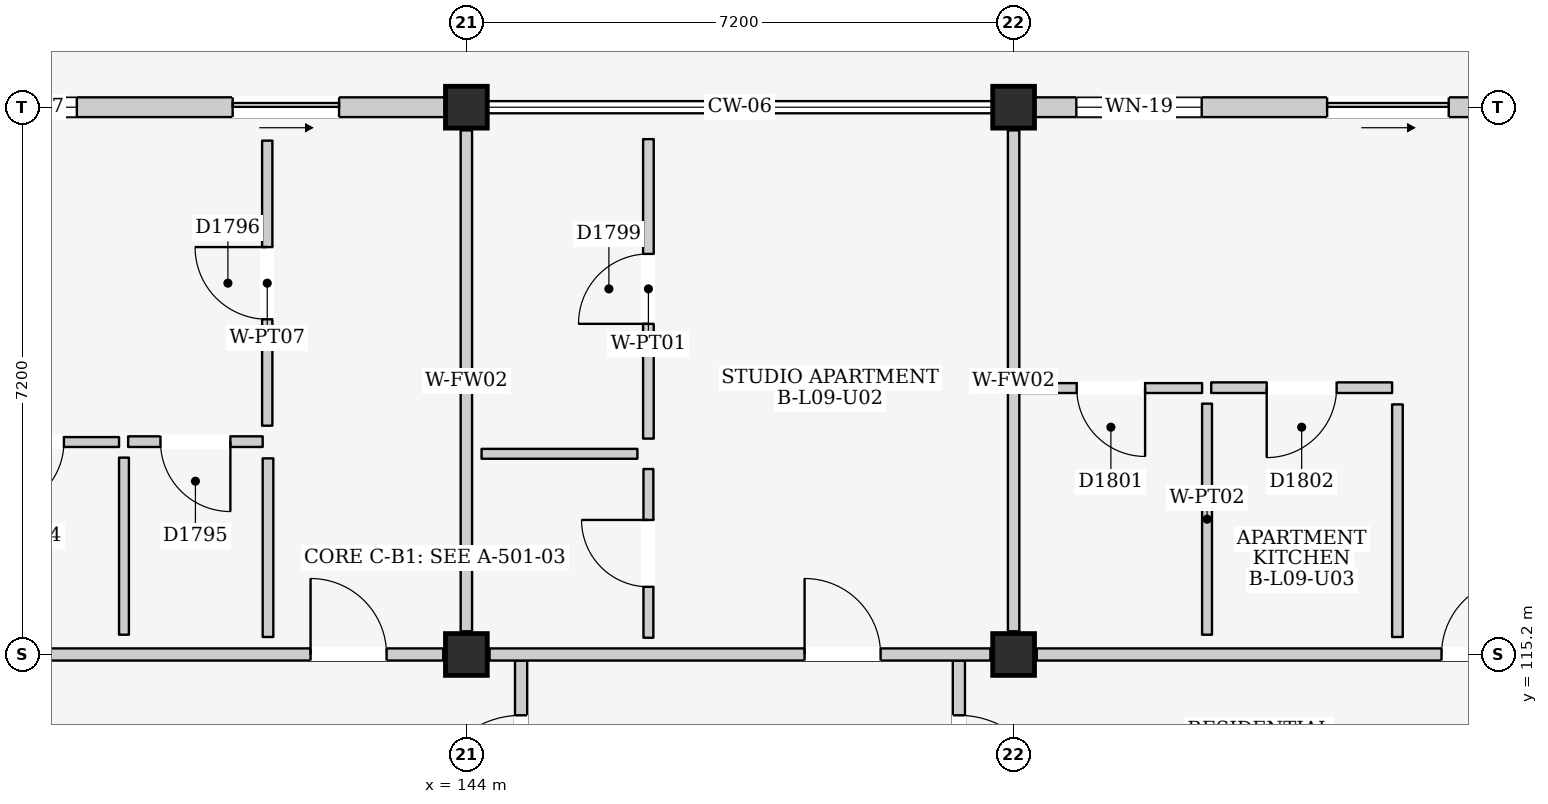
"""IFC4 building model, lengths in metres.
Left out: names, types, materials, properties, quantities, classifications, styles, units other than length and angle.
Written with IfcOpenShell. Run it as: python <this file> out.ifc"""

import sys

from ifc_helpers import new_model, si_unit, direction, frame, frame_2d, origin, origin_2d, place, context, subcontext, project, spatial, rectangle, extrude, element, fill, save


model = new_model("IFC4")
c1 = context("Model", 3, precision=1e-05, world=origin(), true_north=direction((0.0, 1.0)))
c2 = subcontext(c1, "Body", "Model", "MODEL_VIEW")
j1 = project(units=[si_unit("LENGTHUNIT", "METRE"), si_unit("PLANEANGLEUNIT", "RADIAN")], contexts=[c1])
p1 = place(None, origin())
s1 = spatial("IfcSite", under=j1, at=p1, CompositionType="ELEMENT")
p2 = place(p1, origin())
s2 = spatial("IfcBuilding", under=s1, at=p2, CompositionType="ELEMENT")
p3 = place(p2, frame((0.0, 0.0, 31.5)))
s3 = spatial("IfcBuildingStorey", under=s2, at=p3, CompositionType="ELEMENT", Elevation=31.5)
for number, where, z_axis, x_axis in (
    (1, (144.0, 115.2, 0.0), (0.0, 0.0, 1.0), (1.0, 0.0, 0.0)),
    (2, (144.0, 122.4, 0.0), (0.0, 0.0, 1.0), (1.0, 0.0, 0.0)),
    (3, (151.2, 115.2, 0.0), (0.0, 0.0, 1.0), (1.0, 0.0, 0.0)),
    (4, (151.2, 122.4, 0.0), (0.0, 0.0, 1.0), (1.0, 0.0, 0.0)),
):
    element("IfcColumn", number, at=place(p3, frame(where, z_axis=z_axis, x_axis=x_axis)), inside=s3, PredefinedType="COLUMN", context=c2, shape_type="SweptSolid", body=[
        extrude(rectangle(XDim=0.55, YDim=0.55, at=origin_2d()), origin(), (0.0, 0.0, 1.0), 3.3),
    ])
p4 = place(p3, frame((137.075, 122.4, 0.0), z_axis=(0.0, 0.0, 1.0), x_axis=(1.0, 0.0, 0.0)))
e5 = element("IfcWall", 5, at=p4, inside=s3, PredefinedType="ELEMENTEDWALL", context=c2, shape_type="SweptSolid", body=[
    extrude(rectangle(XDim=6.65, YDim=0.26, at=frame_2d((3.325, 0.0))), origin(), (0.0, 0.0, 1.0), 2.615),
])
p5 = place(p4, frame((3.85, 0.0, 0.0)))
e6 = element("IfcOpeningElement", 6, at=p5, cuts=e5, PredefinedType="OPENING", context=c2, shape_type="SweptSolid", body=[
    extrude(rectangle(XDim=1.4, YDim=2.1, at=frame_2d((0.7, 1.05))), frame((0.0, 0.145, 0.0), z_axis=(0.0, -1.0, 0.0), x_axis=(1.0, 0.0, 0.0)), (0.0, 0.0, 1.0), 0.29),
])
p6 = place(p4, frame((0.55, 0.0, 0.9)))
e7 = element("IfcOpeningElement", 7, at=p6, cuts=e5, PredefinedType="OPENING", context=c2, shape_type="SweptSolid", body=[
    extrude(rectangle(XDim=1.25, YDim=1.3, at=frame_2d((0.625, 0.65))), frame((0.0, 0.145, 0.0), z_axis=(0.0, -1.0, 0.0), x_axis=(1.0, 0.0, 0.0)), (0.0, 0.0, 1.0), 0.29),
])
p7 = place(p3, frame((151.475, 122.4, 0.0), z_axis=(0.0, 0.0, 1.0), x_axis=(1.0, 0.0, 0.0)))
e8 = element("IfcWall", 8, at=p7, inside=s3, PredefinedType="ELEMENTEDWALL", context=c2, shape_type="SweptSolid", body=[
    extrude(rectangle(XDim=6.65, YDim=0.26, at=frame_2d((3.325, 0.0))), origin(), (0.0, 0.0, 1.0), 2.615),
])
p8 = place(p7, frame((3.85, 0.0, 0.0)))
e9 = element("IfcOpeningElement", 9, at=p8, cuts=e8, PredefinedType="OPENING", context=c2, shape_type="SweptSolid", body=[
    extrude(rectangle(XDim=1.6, YDim=2.12, at=frame_2d((0.8, 1.06))), frame((0.0, 0.145, 0.0), z_axis=(0.0, -1.0, 0.0), x_axis=(1.0, 0.0, 0.0)), (0.0, 0.0, 1.0), 0.29),
])
p9 = place(p7, frame((0.55, 0.0, 0.9)))
e10 = element("IfcOpeningElement", 10, at=p9, cuts=e8, PredefinedType="OPENING", context=c2, shape_type="SweptSolid", body=[
    extrude(rectangle(XDim=1.65, YDim=1.35, at=frame_2d((0.825, 0.675))), frame((0.0, 0.145, 0.0), z_axis=(0.0, -1.0, 0.0), x_axis=(1.0, 0.0, 0.0)), (0.0, 0.0, 1.0), 0.29),
])
p10 = place(p3, frame((144.72, 111.1, 0.0), z_axis=(0.0, 0.0, 1.0), x_axis=(0.0, 1.0, 0.0)))
e11 = element("IfcWall", 11, at=p10, inside=s3, PredefinedType="PARTITIONING", context=c2, shape_type="SweptSolid", body=[
    extrude(rectangle(XDim=4.02, YDim=0.16, at=frame_2d((2.01, 0.0))), origin(), (0.0, 0.0, 1.0), 3.08),
])
p11 = place(p10, frame((2.1, 0.0, 0.0)))
e12 = element("IfcOpeningElement", 12, at=p11, cuts=e11, PredefinedType="OPENING", context=c2, shape_type="SweptSolid", body=[
    extrude(rectangle(XDim=1.2, YDim=2.2, at=frame_2d((0.6, 1.1))), frame((0.0, 0.095, 0.0), z_axis=(0.0, -1.0, 0.0), x_axis=(1.0, 0.0, 0.0)), (0.0, 0.0, 1.0), 0.19),
])
p12 = place(p3, frame((150.48, 111.1, 0.0), z_axis=(0.0, 0.0, 1.0), x_axis=(0.0, 1.0, 0.0)))
e13 = element("IfcWall", 13, at=p12, inside=s3, PredefinedType="PARTITIONING", context=c2, shape_type="SweptSolid", body=[
    extrude(rectangle(XDim=4.02, YDim=0.16, at=frame_2d((2.01, 0.0))), origin(), (0.0, 0.0, 1.0), 3.08),
])
p13 = place(p12, frame((2.1, 0.0, 0.0)))
e14 = element("IfcOpeningElement", 14, at=p13, cuts=e13, PredefinedType="OPENING", context=c2, shape_type="SweptSolid", body=[
    extrude(rectangle(XDim=1.2, YDim=2.2, at=frame_2d((0.6, 1.1))), frame((0.0, 0.095, 0.0), z_axis=(0.0, -1.0, 0.0), x_axis=(1.0, 0.0, 0.0)), (0.0, 0.0, 1.0), 0.19),
])
p14 = place(p3, frame((137.105, 115.2, 0.0), z_axis=(0.0, 0.0, 1.0), x_axis=(1.0, 0.0, 0.0)))
e15 = element("IfcWall", 15, at=p14, inside=s3, PredefinedType="PARTITIONING", context=c2, shape_type="SweptSolid", body=[
    extrude(rectangle(XDim=6.59, YDim=0.16, at=frame_2d((3.295, 0.0))), origin(), (0.0, 0.0, 1.0), 2.465),
])
p15 = place(p14, frame((4.845, 0.0, 0.0)))
e16 = element("IfcOpeningElement", 16, at=p15, cuts=e15, PredefinedType="OPENING", context=c2, shape_type="SweptSolid", body=[
    extrude(rectangle(XDim=1.0, YDim=2.15, at=frame_2d((0.5, 1.075))), frame((0.0, 0.095, 0.0), z_axis=(0.0, -1.0, 0.0), x_axis=(1.0, 0.0, 0.0)), (0.0, 0.0, 1.0), 0.19),
])
p16 = place(p3, frame((144.0, 115.505, 0.0), z_axis=(0.0, 0.0, 1.0), x_axis=(0.0, 1.0, 0.0)))
e17 = element("IfcWall", 17, at=p16, inside=s3, PredefinedType="PARTITIONING", context=c2, shape_type="SweptSolid", body=[
    extrude(rectangle(XDim=6.59, YDim=0.15, at=frame_2d((3.295, 0.0))), origin(), (0.0, 0.0, 1.0), 2.565),
])
p17 = place(p3, frame((137.08, 117.995, 0.0), z_axis=(0.0, 0.0, 1.0), x_axis=(1.0, 0.0, 0.0)))
e18 = element("IfcWall", 18, at=p17, inside=s3, PredefinedType="PARTITIONING", context=c2, shape_type="SweptSolid", body=[
    extrude(rectangle(XDim=2.35, YDim=0.13, at=frame_2d((1.175, 0.0))), origin(), (0.0, 0.0, 1.0), 3.08),
])
p18 = place(p17, frame((0.725, 0.0, 0.0)))
e19 = element("IfcOpeningElement", 19, at=p18, cuts=e18, PredefinedType="OPENING", context=c2, shape_type="SweptSolid", body=[
    extrude(rectangle(XDim=0.9, YDim=2.1, at=frame_2d((0.45, 1.05))), frame((0.0, 0.08, 0.0), z_axis=(0.0, -1.0, 0.0), x_axis=(1.0, 0.0, 0.0)), (0.0, 0.0, 1.0), 0.16),
])
p19 = place(p3, frame((139.495, 115.46, 0.0), z_axis=(0.0, 0.0, 1.0), x_axis=(0.0, 1.0, 0.0)))
e20 = element("IfcWall", 20, at=p19, inside=s3, PredefinedType="PARTITIONING", context=c2, shape_type="SweptSolid", body=[
    extrude(rectangle(XDim=2.33, YDim=0.13, at=frame_2d((1.165, 0.0))), origin(), (0.0, 0.0, 1.0), 3.08),
])
p20 = place(p3, frame((139.55, 118.0, 0.0), z_axis=(0.0, 0.0, 1.0), x_axis=(1.0, 0.0, 0.0)))
e21 = element("IfcWall", 21, at=p20, inside=s3, PredefinedType="PARTITIONING", context=c2, shape_type="SweptSolid", body=[
    extrude(rectangle(XDim=1.77, YDim=0.14, at=frame_2d((0.885, 0.0))), origin(), (0.0, 0.0, 1.0), 3.08),
])
p21 = place(p20, frame((0.425, 0.0, 0.0)))
e22 = element("IfcOpeningElement", 22, at=p21, cuts=e21, PredefinedType="OPENING", context=c2, shape_type="SweptSolid", body=[
    extrude(rectangle(XDim=0.92, YDim=2.1, at=frame_2d((0.46, 1.05))), frame((0.0, 0.085, 0.0), z_axis=(0.0, -1.0, 0.0), x_axis=(1.0, 0.0, 0.0)), (0.0, 0.0, 1.0), 0.17),
])
p22 = place(p3, frame((141.39, 115.43, 0.0), z_axis=(0.0, 0.0, 1.0), x_axis=(0.0, 1.0, 0.0)))
e23 = element("IfcWall", 23, at=p22, inside=s3, PredefinedType="PARTITIONING", context=c2, shape_type="SweptSolid", body=[
    extrude(rectangle(XDim=2.35, YDim=0.14, at=frame_2d((1.175, 0.0))), origin(), (0.0, 0.0, 1.0), 3.08),
])
p23 = place(p3, frame((141.38, 118.21, 0.0), z_axis=(0.0, 0.0, 1.0), x_axis=(0.0, 1.0, 0.0)))
e24 = element("IfcWall", 24, at=p23, inside=s3, PredefinedType="PARTITIONING", context=c2, shape_type="SweptSolid", body=[
    extrude(rectangle(XDim=3.75, YDim=0.135, at=frame_2d((1.875, 0.0))), origin(), (0.0, 0.0, 1.0), 3.08),
])
p24 = place(p23, frame((1.4, 0.0, 0.0)))
e25 = element("IfcOpeningElement", 25, at=p24, cuts=e24, PredefinedType="OPENING", context=c2, shape_type="SweptSolid", body=[
    extrude(rectangle(XDim=0.95, YDim=2.15, at=frame_2d((0.475, 1.075))), frame((0.0, 0.083, 0.0), z_axis=(0.0, -1.0, 0.0), x_axis=(1.0, 0.0, 0.0)), (0.0, 0.0, 1.0), 0.165),
])
p25 = place(p3, frame((144.305, 115.2, 0.0), z_axis=(0.0, 0.0, 1.0), x_axis=(1.0, 0.0, 0.0)))
e26 = element("IfcWall", 26, at=p25, inside=s3, PredefinedType="PARTITIONING", context=c2, shape_type="SweptSolid", body=[
    extrude(rectangle(XDim=6.59, YDim=0.16, at=frame_2d((3.295, 0.0))), origin(), (0.0, 0.0, 1.0), 2.465),
])
p26 = place(p25, frame((4.145, 0.0, 0.0)))
e27 = element("IfcOpeningElement", 27, at=p26, cuts=e26, PredefinedType="OPENING", context=c2, shape_type="SweptSolid", body=[
    extrude(rectangle(XDim=1.0, YDim=2.15, at=frame_2d((0.5, 1.075))), frame((0.0, 0.095, 0.0), z_axis=(0.0, -1.0, 0.0), x_axis=(1.0, 0.0, 0.0)), (0.0, 0.0, 1.0), 0.19),
])
p27 = place(p3, frame((151.2, 115.505, 0.0), z_axis=(0.0, 0.0, 1.0), x_axis=(0.0, 1.0, 0.0)))
e28 = element("IfcWall", 28, at=p27, inside=s3, PredefinedType="PARTITIONING", context=c2, shape_type="SweptSolid", body=[
    extrude(rectangle(XDim=6.59, YDim=0.15, at=frame_2d((3.295, 0.0))), origin(), (0.0, 0.0, 1.0), 2.565),
])
p28 = place(p3, frame((144.2, 117.84, 0.0), z_axis=(0.0, 0.0, 1.0), x_axis=(1.0, 0.0, 0.0)))
e29 = element("IfcWall", 29, at=p28, inside=s3, PredefinedType="PARTITIONING", context=c2, shape_type="SweptSolid", body=[
    extrude(rectangle(XDim=2.05, YDim=0.13, at=frame_2d((1.025, 0.0))), origin(), (0.0, 0.0, 1.0), 3.08),
])
p29 = place(p3, frame((146.395, 115.42, 0.0), z_axis=(0.0, 0.0, 1.0), x_axis=(0.0, 1.0, 0.0)))
e30 = element("IfcWall", 30, at=p29, inside=s3, PredefinedType="PARTITIONING", context=c2, shape_type="SweptSolid", body=[
    extrude(rectangle(XDim=2.22, YDim=0.13, at=frame_2d((1.11, 0.0))), origin(), (0.0, 0.0, 1.0), 3.08),
])
p30 = place(p29, frame((0.67, 0.0, 0.0)))
e31 = element("IfcOpeningElement", 31, at=p30, cuts=e30, PredefinedType="OPENING", context=c2, shape_type="SweptSolid", body=[
    extrude(rectangle(XDim=0.88, YDim=2.1, at=frame_2d((0.44, 1.05))), frame((0.0, 0.08, 0.0), z_axis=(0.0, -1.0, 0.0), x_axis=(1.0, 0.0, 0.0)), (0.0, 0.0, 1.0), 0.16),
])
p31 = place(p3, frame((146.395, 118.04, 0.0), z_axis=(0.0, 0.0, 1.0), x_axis=(0.0, 1.0, 0.0)))
e32 = element("IfcWall", 32, at=p31, inside=s3, PredefinedType="PARTITIONING", context=c2, shape_type="SweptSolid", body=[
    extrude(rectangle(XDim=3.94, YDim=0.14, at=frame_2d((1.97, 0.0))), origin(), (0.0, 0.0, 1.0), 3.08),
])
p32 = place(p31, frame((1.51, 0.0, 0.0)))
e33 = element("IfcOpeningElement", 33, at=p32, cuts=e32, PredefinedType="OPENING", context=c2, shape_type="SweptSolid", body=[
    extrude(rectangle(XDim=0.92, YDim=2.1, at=frame_2d((0.46, 1.05))), frame((0.0, 0.085, 0.0), z_axis=(0.0, -1.0, 0.0), x_axis=(1.0, 0.0, 0.0)), (0.0, 0.0, 1.0), 0.17),
])
p33 = place(p3, frame((151.505, 115.2, 0.0), z_axis=(0.0, 0.0, 1.0), x_axis=(1.0, 0.0, 0.0)))
e34 = element("IfcWall", 34, at=p33, inside=s3, PredefinedType="PARTITIONING", context=c2, shape_type="SweptSolid", body=[
    extrude(rectangle(XDim=6.59, YDim=0.16, at=frame_2d((3.295, 0.0))), origin(), (0.0, 0.0, 1.0), 2.465),
])
p34 = place(p33, frame((5.325, 0.0, 0.0)))
e35 = element("IfcOpeningElement", 35, at=p34, cuts=e34, PredefinedType="OPENING", context=c2, shape_type="SweptSolid", body=[
    extrude(rectangle(XDim=1.0, YDim=2.15, at=frame_2d((0.5, 1.075))), frame((0.0, 0.095, 0.0), z_axis=(0.0, -1.0, 0.0), x_axis=(1.0, 0.0, 0.0)), (0.0, 0.0, 1.0), 0.19),
])
p35 = place(p3, frame((151.28, 118.705, 0.0), z_axis=(0.0, 0.0, 1.0), x_axis=(1.0, 0.0, 0.0)))
e36 = element("IfcWall", 36, at=p35, inside=s3, PredefinedType="PARTITIONING", context=c2, shape_type="SweptSolid", body=[
    extrude(rectangle(XDim=2.4, YDim=0.13, at=frame_2d((1.2, 0.0))), origin(), (0.0, 0.0, 1.0), 3.08),
])
p36 = place(p35, frame((0.75, 0.0, 0.0)))
e37 = element("IfcOpeningElement", 37, at=p36, cuts=e36, PredefinedType="OPENING", context=c2, shape_type="SweptSolid", body=[
    extrude(rectangle(XDim=0.9, YDim=2.1, at=frame_2d((0.45, 1.05))), frame((0.0, 0.08, 0.0), z_axis=(0.0, -1.0, 0.0), x_axis=(1.0, 0.0, 0.0)), (0.0, 0.0, 1.0), 0.16),
])
p37 = place(p3, frame((153.745, 115.46, 0.0), z_axis=(0.0, 0.0, 1.0), x_axis=(0.0, 1.0, 0.0)))
e38 = element("IfcWall", 38, at=p37, inside=s3, PredefinedType="PARTITIONING", context=c2, shape_type="SweptSolid", body=[
    extrude(rectangle(XDim=3.04, YDim=0.13, at=frame_2d((1.52, 0.0))), origin(), (0.0, 0.0, 1.0), 3.08),
])
p38 = place(p3, frame((153.8, 118.71, 0.0), z_axis=(0.0, 0.0, 1.0), x_axis=(1.0, 0.0, 0.0)))
e39 = element("IfcWall", 39, at=p38, inside=s3, PredefinedType="PARTITIONING", context=c2, shape_type="SweptSolid", body=[
    extrude(rectangle(XDim=2.38, YDim=0.14, at=frame_2d((1.19, 0.0))), origin(), (0.0, 0.0, 1.0), 3.08),
])
p39 = place(p38, frame((0.73, 0.0, 0.0)))
e40 = element("IfcOpeningElement", 40, at=p39, cuts=e39, PredefinedType="OPENING", context=c2, shape_type="SweptSolid", body=[
    extrude(rectangle(XDim=0.92, YDim=2.1, at=frame_2d((0.46, 1.05))), frame((0.0, 0.085, 0.0), z_axis=(0.0, -1.0, 0.0), x_axis=(1.0, 0.0, 0.0)), (0.0, 0.0, 1.0), 0.17),
])
p40 = place(p3, frame((156.25, 115.43, 0.0), z_axis=(0.0, 0.0, 1.0), x_axis=(0.0, 1.0, 0.0)))
e41 = element("IfcWall", 41, at=p40, inside=s3, PredefinedType="PARTITIONING", context=c2, shape_type="SweptSolid", body=[
    extrude(rectangle(XDim=3.06, YDim=0.14, at=frame_2d((1.53, 0.0))), origin(), (0.0, 0.0, 1.0), 3.08),
])
p41 = place(p5, frame((1.4, 0.0, 0.0), z_axis=(0.0, 0.0, 1.0), x_axis=(-1.0, 0.0, 0.0)))
e42 = element("IfcDoor", 42, at=p41, inside=s3, OperationType="SLIDING_TO_RIGHT", PredefinedType="DOOR", context=c2, shape_type="SweptSolid", body=[
    extrude(rectangle(XDim=1.4, YDim=2.1, at=frame_2d((0.7, 1.05))), frame((0.0, 0.025, 0.0), z_axis=(0.0, -1.0, 0.0), x_axis=(1.0, 0.0, 0.0)), (0.0, 0.0, 1.0), 0.05),
])
fill(e6, e42)
p42 = place(p6, origin())
e43 = element("IfcWindow", 43, at=p42, inside=s3, PartitioningType="SINGLE_PANEL", PredefinedType="WINDOW", context=c2, shape_type="SweptSolid", body=[
    extrude(rectangle(XDim=1.25, YDim=1.3, at=frame_2d((0.625, 0.65))), frame((0.0, 0.03, 0.0), z_axis=(0.0, -1.0, 0.0), x_axis=(1.0, 0.0, 0.0)), (0.0, 0.0, 1.0), 0.06),
])
fill(e7, e43)
p43 = place(p8, frame((1.6, 0.0, 0.0), z_axis=(0.0, 0.0, 1.0), x_axis=(-1.0, 0.0, 0.0)))
e44 = element("IfcDoor", 44, at=p43, inside=s3, OperationType="SLIDING_TO_RIGHT", PredefinedType="DOOR", context=c2, shape_type="SweptSolid", body=[
    extrude(rectangle(XDim=1.6, YDim=2.12, at=frame_2d((0.8, 1.06))), frame((0.0, 0.025, 0.0), z_axis=(0.0, -1.0, 0.0), x_axis=(1.0, 0.0, 0.0)), (0.0, 0.0, 1.0), 0.05),
])
fill(e9, e44)
p44 = place(p9, origin())
e45 = element("IfcWindow", 45, at=p44, inside=s3, PartitioningType="DOUBLE_PANEL_VERTICAL", PredefinedType="WINDOW", context=c2, shape_type="SweptSolid", body=[
    extrude(rectangle(XDim=1.65, YDim=1.35, at=frame_2d((0.825, 0.675))), frame((0.0, 0.03, 0.0), z_axis=(0.0, -1.0, 0.0), x_axis=(1.0, 0.0, 0.0)), (0.0, 0.0, 1.0), 0.06),
])
fill(e10, e45)
p45 = place(p11, origin())
e46 = element("IfcDoor", 46, at=p45, inside=s3, OperationType="SINGLE_SWING_LEFT", PredefinedType="DOOR", context=c2, shape_type="SweptSolid", body=[
    extrude(rectangle(XDim=1.2, YDim=2.2, at=frame_2d((0.6, 1.1))), frame((0.0, 0.025, 0.0), z_axis=(0.0, -1.0, 0.0), x_axis=(1.0, 0.0, 0.0)), (0.0, 0.0, 1.0), 0.05),
])
fill(e12, e46)
p46 = place(p13, frame((1.2, 0.0, 0.0), z_axis=(0.0, 0.0, 1.0), x_axis=(-1.0, 0.0, 0.0)))
e47 = element("IfcDoor", 47, at=p46, inside=s3, OperationType="SINGLE_SWING_RIGHT", PredefinedType="DOOR", context=c2, shape_type="SweptSolid", body=[
    extrude(rectangle(XDim=1.2, YDim=2.2, at=frame_2d((0.6, 1.1))), frame((0.0, 0.025, 0.0), z_axis=(0.0, -1.0, 0.0), x_axis=(1.0, 0.0, 0.0)), (0.0, 0.0, 1.0), 0.05),
])
fill(e14, e47)
p47 = place(p15, origin())
e48 = element("IfcDoor", 48, at=p47, inside=s3, OperationType="SINGLE_SWING_LEFT", PredefinedType="DOOR", context=c2, shape_type="SweptSolid", body=[
    extrude(rectangle(XDim=1.0, YDim=2.15, at=frame_2d((0.5, 1.075))), frame((0.0, 0.025, 0.0), z_axis=(0.0, -1.0, 0.0), x_axis=(1.0, 0.0, 0.0)), (0.0, 0.0, 1.0), 0.05),
])
fill(e16, e48)
p48 = place(p18, frame((0.9, 0.0, 0.0), z_axis=(0.0, 0.0, 1.0), x_axis=(-1.0, 0.0, 0.0)))
e49 = element("IfcDoor", 49, at=p48, inside=s3, OperationType="SINGLE_SWING_RIGHT", PredefinedType="DOOR", context=c2, shape_type="SweptSolid", body=[
    extrude(rectangle(XDim=0.9, YDim=2.1, at=frame_2d((0.45, 1.05))), frame((0.0, 0.025, 0.0), z_axis=(0.0, -1.0, 0.0), x_axis=(1.0, 0.0, 0.0)), (0.0, 0.0, 1.0), 0.05),
])
fill(e19, e49)
p49 = place(p21, frame((0.92, 0.0, 0.0), z_axis=(0.0, 0.0, 1.0), x_axis=(-1.0, 0.0, 0.0)))
e50 = element("IfcDoor", 50, at=p49, inside=s3, OperationType="SINGLE_SWING_LEFT", PredefinedType="DOOR", context=c2, shape_type="SweptSolid", body=[
    extrude(rectangle(XDim=0.92, YDim=2.1, at=frame_2d((0.46, 1.05))), frame((0.0, 0.025, 0.0), z_axis=(0.0, -1.0, 0.0), x_axis=(1.0, 0.0, 0.0)), (0.0, 0.0, 1.0), 0.05),
])
fill(e22, e50)
p50 = place(p24, origin())
e51 = element("IfcDoor", 51, at=p50, inside=s3, OperationType="SINGLE_SWING_RIGHT", PredefinedType="DOOR", context=c2, shape_type="SweptSolid", body=[
    extrude(rectangle(XDim=0.95, YDim=2.15, at=frame_2d((0.475, 1.075))), frame((0.0, 0.025, 0.0), z_axis=(0.0, -1.0, 0.0), x_axis=(1.0, 0.0, 0.0)), (0.0, 0.0, 1.0), 0.05),
])
fill(e25, e51)
p51 = place(p26, origin())
e52 = element("IfcDoor", 52, at=p51, inside=s3, OperationType="SINGLE_SWING_LEFT", PredefinedType="DOOR", context=c2, shape_type="SweptSolid", body=[
    extrude(rectangle(XDim=1.0, YDim=2.15, at=frame_2d((0.5, 1.075))), frame((0.0, 0.025, 0.0), z_axis=(0.0, -1.0, 0.0), x_axis=(1.0, 0.0, 0.0)), (0.0, 0.0, 1.0), 0.05),
])
fill(e27, e52)
p52 = place(p30, origin())
e53 = element("IfcDoor", 53, at=p52, inside=s3, OperationType="SINGLE_SWING_RIGHT", PredefinedType="DOOR", context=c2, shape_type="SweptSolid", body=[
    extrude(rectangle(XDim=0.88, YDim=2.1, at=frame_2d((0.44, 1.05))), frame((0.0, 0.025, 0.0), z_axis=(0.0, -1.0, 0.0), x_axis=(1.0, 0.0, 0.0)), (0.0, 0.0, 1.0), 0.05),
])
fill(e31, e53)
p53 = place(p32, origin())
e54 = element("IfcDoor", 54, at=p53, inside=s3, OperationType="SINGLE_SWING_LEFT", PredefinedType="DOOR", context=c2, shape_type="SweptSolid", body=[
    extrude(rectangle(XDim=0.92, YDim=2.1, at=frame_2d((0.46, 1.05))), frame((0.0, 0.025, 0.0), z_axis=(0.0, -1.0, 0.0), x_axis=(1.0, 0.0, 0.0)), (0.0, 0.0, 1.0), 0.05),
])
fill(e33, e54)
p54 = place(p34, origin())
e55 = element("IfcDoor", 55, at=p54, inside=s3, OperationType="SINGLE_SWING_RIGHT", PredefinedType="DOOR", context=c2, shape_type="SweptSolid", body=[
    extrude(rectangle(XDim=1.0, YDim=2.15, at=frame_2d((0.5, 1.075))), frame((0.0, 0.025, 0.0), z_axis=(0.0, -1.0, 0.0), x_axis=(1.0, 0.0, 0.0)), (0.0, 0.0, 1.0), 0.05),
])
fill(e35, e55)
p55 = place(p36, frame((0.9, 0.0, 0.0), z_axis=(0.0, 0.0, 1.0), x_axis=(-1.0, 0.0, 0.0)))
e56 = element("IfcDoor", 56, at=p55, inside=s3, OperationType="SINGLE_SWING_LEFT", PredefinedType="DOOR", context=c2, shape_type="SweptSolid", body=[
    extrude(rectangle(XDim=0.9, YDim=2.1, at=frame_2d((0.45, 1.05))), frame((0.0, 0.025, 0.0), z_axis=(0.0, -1.0, 0.0), x_axis=(1.0, 0.0, 0.0)), (0.0, 0.0, 1.0), 0.05),
])
fill(e37, e56)
p56 = place(p39, frame((0.92, 0.0, 0.0), z_axis=(0.0, 0.0, 1.0), x_axis=(-1.0, 0.0, 0.0)))
e57 = element("IfcDoor", 57, at=p56, inside=s3, OperationType="SINGLE_SWING_RIGHT", PredefinedType="DOOR", context=c2, shape_type="SweptSolid", body=[
    extrude(rectangle(XDim=0.92, YDim=2.1, at=frame_2d((0.46, 1.05))), frame((0.0, 0.025, 0.0), z_axis=(0.0, -1.0, 0.0), x_axis=(1.0, 0.0, 0.0)), (0.0, 0.0, 1.0), 0.05),
])
fill(e40, e57)
save(model, sys.argv[1])
